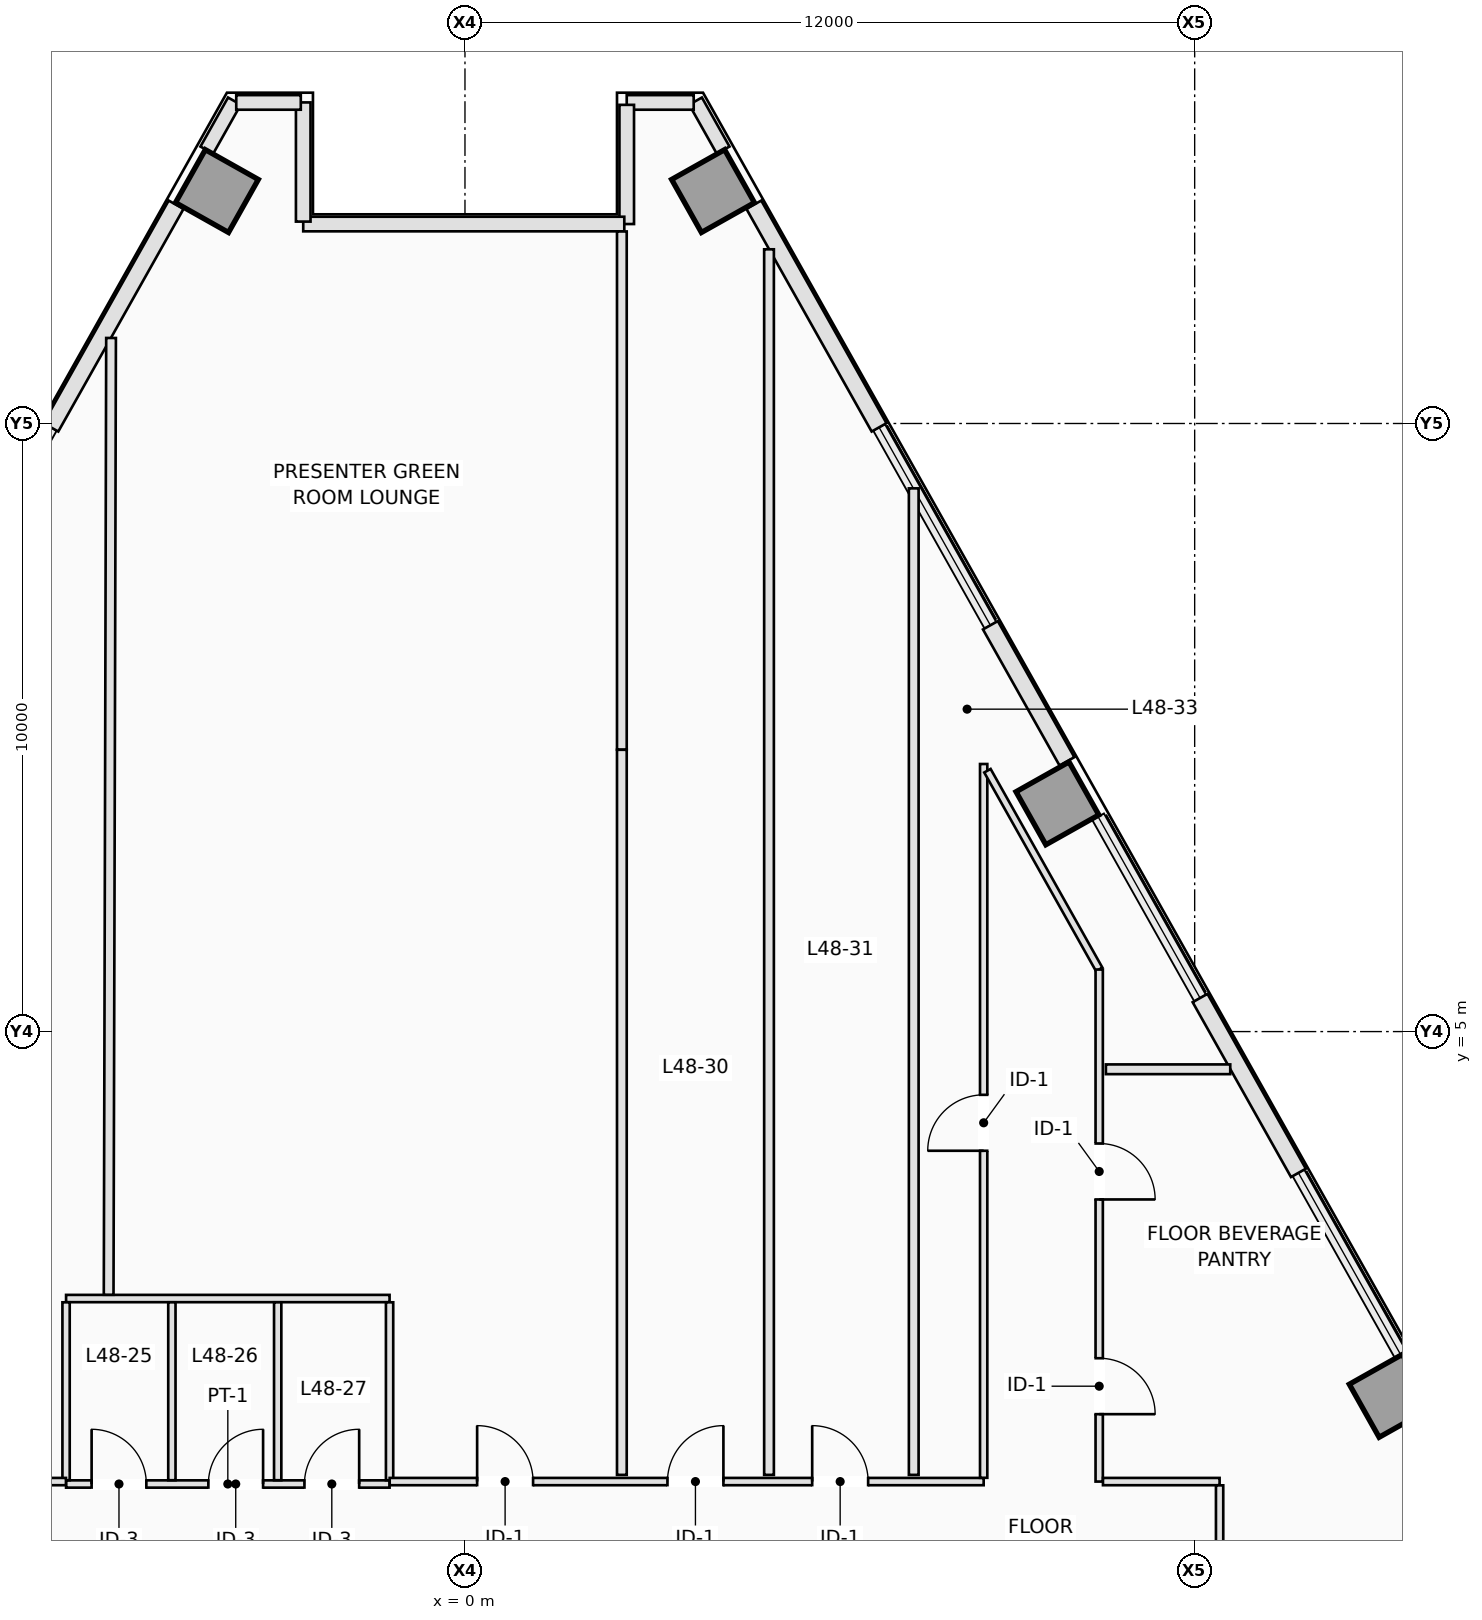
"""IFC4 building model, lengths in metres.
Left out: names, types, materials, properties, quantities, classifications, styles, units other than length and angle.
Written with IfcOpenShell. Run it as: python <this file> out.ifc"""

import sys

from ifc_helpers import new_model, si_unit, direction, frame, frame_2d, origin, origin_2d, place, context, subcontext, project, spatial, rectangle, extrude, element, fill, save


model = new_model("IFC4")
c1 = context("Model", 3, precision=1e-05, world=origin(), true_north=direction((0.0, 1.0)))
c2 = subcontext(c1, "Body", "Model", "MODEL_VIEW")
j1 = project(units=[si_unit("LENGTHUNIT", "METRE"), si_unit("PLANEANGLEUNIT", "RADIAN")], contexts=[c1])
p1 = place(None, origin())
s1 = spatial("IfcSite", under=j1, at=p1, CompositionType="ELEMENT")
p2 = place(p1, origin())
s2 = spatial("IfcBuilding", under=s1, at=p2, CompositionType="ELEMENT")
p3 = place(p2, frame((0.0, 0.0, 175.5)))
s3 = spatial("IfcBuildingStorey", under=s2, at=p3, CompositionType="ELEMENT", Elevation=175.5)
for number, where, z_axis, x_axis in (
    (1, (15.224, -0.991, 0.0), (0.0, 0.0, 1.0), (0.872, 0.49, 0.0)),
    (2, (9.743, 8.753, 0.0), (0.0, 0.0, 1.0), (0.872, 0.49, 0.0)),
    (3, (4.079, 18.822, 0.0), (0.0, 0.0, 1.0), (0.872, 0.49, 0.0)),
    (4, (-4.079, 18.822, 0.0), (0.0, 0.0, 1.0), (-0.872, 0.49, 0.0)),
):
    element("IfcColumn", number, at=place(p3, frame(where, z_axis=z_axis, x_axis=x_axis)), inside=s3, PredefinedType="COLUMN", context=c2, shape_type="SweptSolid", body=[
        extrude(rectangle(XDim=1.0, YDim=1.0, at=origin_2d()), origin(), (0.0, 0.0, 1.0), 3.5),
    ])
p4 = place(p3, frame((3.792, 20.302, 0.0), z_axis=(0.0, 0.0, 1.0), x_axis=(0.490048346303, -0.871695255399, 0.0)))
e5 = element("IfcWall", 5, at=p4, inside=s3, PredefinedType="STANDARD", context=c2, shape_type="SweptSolid", body=[
    extrude(rectangle(XDim=0.926, YDim=0.24, at=frame_2d((0.463, 0.0))), origin(), (0.0, 0.0, 1.0), 3.14),
])
p5 = place(p3, frame((4.751, 18.597, 0.0), z_axis=(0.0, 0.0, 1.0), x_axis=(0.490250201787, -0.871581745821, 0.0)))
e6 = element("IfcWall", 6, at=p5, inside=s3, PredefinedType="STANDARD", context=c2, shape_type="SweptSolid", body=[
    extrude(rectangle(XDim=4.201, YDim=0.28, at=frame_2d((2.1, 0.0))), origin(), (0.0, 0.0, 1.0), 3.14),
])
p6 = place(p3, frame((8.641, 11.682, 0.0), z_axis=(0.0, 0.0, 1.0), x_axis=(0.490301864627, -0.871552684319, 0.0)))
e7 = element("IfcWall", 7, at=p6, inside=s3, PredefinedType="STANDARD", context=c2, shape_type="SweptSolid", body=[
    extrude(rectangle(XDim=2.568, YDim=0.28, at=frame_2d((1.284, 0.0))), origin(), (0.0, 0.0, 1.0), 3.14),
])
p7 = place(p3, frame((12.089, 5.552, 0.0), z_axis=(0.0, 0.0, 1.0), x_axis=(0.490285834707, -0.871561701938, 0.0)))
e8 = element("IfcWall", 8, at=p7, inside=s3, PredefinedType="STANDARD", context=c2, shape_type="SweptSolid", body=[
    extrude(rectangle(XDim=3.299, YDim=0.28, at=frame_2d((1.649, 0.0))), origin(), (0.0, 0.0, 1.0), 3.14),
])
p8 = place(p3, frame((-4.246, 19.495, 0.0), z_axis=(0.0, 0.0, 1.0), x_axis=(0.490048346303, 0.871695255399, 0.0)))
e9 = element("IfcWall", 9, at=p8, inside=s3, PredefinedType="STANDARD", context=c2, shape_type="SweptSolid", body=[
    extrude(rectangle(XDim=0.926, YDim=0.24, at=frame_2d((0.463, 0.0))), origin(), (0.0, 0.0, 1.0), 3.14),
])
p9 = place(p3, frame((-6.81, 14.936, 0.0), z_axis=(0.0, 0.0, 1.0), x_axis=(0.490250201787, 0.871581745821, 0.0)))
e10 = element("IfcWall", 10, at=p9, inside=s3, PredefinedType="STANDARD", context=c2, shape_type="SweptSolid", body=[
    extrude(rectangle(XDim=4.201, YDim=0.28, at=frame_2d((2.1, 0.0))), origin(), (0.0, 0.0, 1.0), 3.14),
])
p10 = place(p3, frame((3.761, 20.28, 0.0), z_axis=(0.0, 0.0, 1.0), x_axis=(-1.0, 0.0, 0.0)))
e11 = element("IfcWall", 11, at=p10, inside=s3, PredefinedType="STANDARD", context=c2, shape_type="SweptSolid", body=[
    extrude(rectangle(XDim=1.102, YDim=0.24, at=frame_2d((0.551, 0.0))), origin(), (0.0, 0.0, 1.0), 3.14),
])
p11 = place(p3, frame((2.66, 20.24, 0.0), z_axis=(0.0, 0.0, 1.0), x_axis=(0.0, -1.0, 0.0)))
e12 = element("IfcWall", 12, at=p11, inside=s3, PredefinedType="STANDARD", context=c2, shape_type="SweptSolid", body=[
    extrude(rectangle(XDim=1.96, YDim=0.24, at=frame_2d((0.98, 0.0))), origin(), (0.0, 0.0, 1.0), 3.14),
])
p12 = place(p3, frame((2.62, 18.28, 0.0), z_axis=(0.0, 0.0, 1.0), x_axis=(-1.0, 0.0, 0.0)))
e13 = element("IfcWall", 13, at=p12, inside=s3, PredefinedType="STANDARD", context=c2, shape_type="SweptSolid", body=[
    extrude(rectangle(XDim=5.28, YDim=0.24, at=frame_2d((2.64, 0.0))), origin(), (0.0, 0.0, 1.0), 2.607),
])
p13 = place(p3, frame((-2.66, 18.32, 0.0), z_axis=(0.0, 0.0, 1.0), x_axis=(0.0, 1.0, 0.0)))
e14 = element("IfcWall", 14, at=p13, inside=s3, PredefinedType="STANDARD", context=c2, shape_type="SweptSolid", body=[
    extrude(rectangle(XDim=1.96, YDim=0.24, at=frame_2d((0.98, 0.0))), origin(), (0.0, 0.0, 1.0), 3.14),
])
p14 = place(p3, frame((-2.7, 20.28, 0.0), z_axis=(0.0, 0.0, 1.0), x_axis=(-1.0, 0.0, 0.0)))
e15 = element("IfcWall", 15, at=p14, inside=s3, PredefinedType="STANDARD", context=c2, shape_type="SweptSolid", body=[
    extrude(rectangle(XDim=1.062, YDim=0.24, at=frame_2d((0.531, 0.0))), origin(), (0.0, 0.0, 1.0), 3.14),
])
p15 = place(p3, frame((-6.56, -2.44, 0.0), z_axis=(0.0, 0.0, 1.0), x_axis=(1.0, 0.0, 0.0)))
e16 = element("IfcWall", 16, at=p15, inside=s3, PredefinedType="PARTITIONING", context=c2, shape_type="SweptSolid", body=[
    extrude(rectangle(XDim=5.32, YDim=0.12, at=frame_2d((2.66, 0.0))), origin(), (0.0, 0.0, 1.0), 2.781),
])
p16 = place(p15, frame((0.42, 0.0, 0.0)))
e17 = element("IfcOpeningElement", 17, at=p16, cuts=e16, PredefinedType="OPENING", context=c2, shape_type="SweptSolid", body=[
    extrude(rectangle(XDim=0.9, YDim=2.12, at=frame_2d((0.45, 1.06))), frame((0.0, 0.07, 0.0), z_axis=(0.0, -1.0, 0.0), x_axis=(1.0, 0.0, 0.0)), (0.0, 0.0, 1.0), 0.14),
])
p17 = place(p15, frame((2.34, 0.0, 0.0)))
e18 = element("IfcOpeningElement", 18, at=p17, cuts=e16, PredefinedType="OPENING", context=c2, shape_type="SweptSolid", body=[
    extrude(rectangle(XDim=0.9, YDim=2.12, at=frame_2d((0.45, 1.06))), frame((0.0, 0.07, 0.0), z_axis=(0.0, -1.0, 0.0), x_axis=(1.0, 0.0, 0.0)), (0.0, 0.0, 1.0), 0.14),
])
p18 = place(p15, frame((3.92, 0.0, 0.0)))
e19 = element("IfcOpeningElement", 19, at=p18, cuts=e16, PredefinedType="OPENING", context=c2, shape_type="SweptSolid", body=[
    extrude(rectangle(XDim=0.9, YDim=2.12, at=frame_2d((0.45, 1.06))), frame((0.0, 0.07, 0.0), z_axis=(0.0, -1.0, 0.0), x_axis=(1.0, 0.0, 0.0)), (0.0, 0.0, 1.0), 0.14),
])
p19 = place(p3, frame((-6.56, 0.61, 0.0), z_axis=(0.0, 0.0, 1.0), x_axis=(1.0, 0.0, 0.0)))
e20 = element("IfcWall", 20, at=p19, inside=s3, PredefinedType="PARTITIONING", context=c2, shape_type="SweptSolid", body=[
    extrude(rectangle(XDim=5.32, YDim=0.12, at=frame_2d((2.66, 0.0))), origin(), (0.0, 0.0, 1.0), 3.14),
])
for number, where, z_axis, x_axis in (
    (21, (-6.56, -2.378, 0.0), (0.0, 0.0, 1.0), (0.0, 1.0, 0.0)),
    (22, (-4.82, -2.378, 0.0), (0.0, 0.0, 1.0), (0.0, 1.0, 0.0)),
    (23, (-3.08, -2.378, 0.0), (0.0, 0.0, 1.0), (0.0, 1.0, 0.0)),
    (24, (-1.24, -2.378, 0.0), (0.0, 0.0, 1.0), (0.0, 1.0, 0.0)),
):
    element("IfcWall", number, at=place(p3, frame(where, z_axis=z_axis, x_axis=x_axis)), inside=s3, PredefinedType="PARTITIONING", context=c2, shape_type="SweptSolid", body=[
        extrude(rectangle(XDim=2.926, YDim=0.12, at=frame_2d((1.463, 0.0))), origin(), (0.0, 0.0, 1.0), 3.14),
    ])
p20 = place(p3, frame((-8.408, -2.4, 0.0), z_axis=(0.0, 0.0, 1.0), x_axis=(1.0, 0.0, 0.0)))
e25 = element("IfcWall", 25, at=p20, inside=s3, PredefinedType="PARTITIONING", context=c2, shape_type="SweptSolid", body=[
    extrude(rectangle(XDim=1.846, YDim=0.12, at=frame_2d((0.923, 0.0))), origin(), (0.0, 0.0, 1.0), 3.14),
])
p21 = place(p3, frame((-1.238, -2.4, 0.0), z_axis=(0.0, 0.0, 1.0), x_axis=(1.0, 0.0, 0.0)))
e26 = element("IfcWall", 26, at=p21, inside=s3, PredefinedType="PARTITIONING", context=c2, shape_type="SweptSolid", body=[
    extrude(rectangle(XDim=9.768, YDim=0.12, at=frame_2d((4.884, 0.0))), origin(), (0.0, 0.0, 1.0), 2.781),
])
p22 = place(p21, frame((1.438, 0.0, 0.0)))
e27 = element("IfcOpeningElement", 27, at=p22, cuts=e26, PredefinedType="OPENING", context=c2, shape_type="SweptSolid", body=[
    extrude(rectangle(XDim=0.92, YDim=2.12, at=frame_2d((0.46, 1.06))), frame((0.0, 0.07, 0.0), z_axis=(0.0, -1.0, 0.0), x_axis=(1.0, 0.0, 0.0)), (0.0, 0.0, 1.0), 0.14),
])
p23 = place(p21, frame((4.568, 0.0, 0.0)))
e28 = element("IfcOpeningElement", 28, at=p23, cuts=e26, PredefinedType="OPENING", context=c2, shape_type="SweptSolid", body=[
    extrude(rectangle(XDim=0.92, YDim=2.12, at=frame_2d((0.46, 1.06))), frame((0.0, 0.07, 0.0), z_axis=(0.0, -1.0, 0.0), x_axis=(1.0, 0.0, 0.0)), (0.0, 0.0, 1.0), 0.14),
])
p24 = place(p21, frame((6.948, 0.0, 0.0)))
e29 = element("IfcOpeningElement", 29, at=p24, cuts=e26, PredefinedType="OPENING", context=c2, shape_type="SweptSolid", body=[
    extrude(rectangle(XDim=0.92, YDim=2.12, at=frame_2d((0.46, 1.06))), frame((0.0, 0.07, 0.0), z_axis=(0.0, -1.0, 0.0), x_axis=(1.0, 0.0, 0.0)), (0.0, 0.0, 1.0), 0.14),
])
p25 = place(p3, frame((8.53, -2.338, 0.0), z_axis=(0.0, 0.0, 1.0), x_axis=(0.0, 1.0, 0.0)))
e30 = element("IfcWall", 30, at=p25, inside=s3, PredefinedType="PARTITIONING", context=c2, shape_type="SweptSolid", body=[
    extrude(rectangle(XDim=11.738, YDim=0.12, at=frame_2d((5.869, 0.0))), origin(), (0.0, 0.0, 1.0), 3.14),
])
p26 = place(p25, frame((5.378, 0.0, 0.0)))
e31 = element("IfcOpeningElement", 31, at=p26, cuts=e30, PredefinedType="OPENING", context=c2, shape_type="SweptSolid", body=[
    extrude(rectangle(XDim=0.92, YDim=2.12, at=frame_2d((0.46, 1.06))), frame((0.0, 0.07, 0.0), z_axis=(0.0, -1.0, 0.0), x_axis=(1.0, 0.0, 0.0)), (0.0, 0.0, 1.0), 0.14),
])
p27 = place(p3, frame((8.592, 9.29, 0.0), z_axis=(0.0, 0.0, 1.0), x_axis=(0.490264331639, -0.871573797864, 0.0)))
e32 = element("IfcWall", 32, at=p27, inside=s3, PredefinedType="PARTITIONING", context=c2, shape_type="SweptSolid", body=[
    extrude(rectangle(XDim=3.749, YDim=0.12, at=frame_2d((1.875, 0.0))), origin(), (0.0, 0.0, 1.0), 3.14),
])
p28 = place(p3, frame((10.43, 6.02, 0.0), z_axis=(0.0, 0.0, 1.0), x_axis=(0.0, -1.0, 0.0)))
e33 = element("IfcWall", 33, at=p28, inside=s3, PredefinedType="PARTITIONING", context=c2, shape_type="SweptSolid", body=[
    extrude(rectangle(XDim=8.42, YDim=0.12, at=frame_2d((4.21, 0.0))), origin(), (0.0, 0.0, 1.0), 3.14),
])
p29 = place(p28, frame((2.861, 0.0, 0.0)))
e34 = element("IfcOpeningElement", 34, at=p29, cuts=e33, PredefinedType="OPENING", context=c2, shape_type="SweptSolid", body=[
    extrude(rectangle(XDim=0.92, YDim=2.12, at=frame_2d((0.46, 1.06))), frame((0.0, 0.07, 0.0), z_axis=(0.0, -1.0, 0.0), x_axis=(1.0, 0.0, 0.0)), (0.0, 0.0, 1.0), 0.14),
])
p30 = place(p28, frame((6.392, 0.0, 0.0)))
e35 = element("IfcOpeningElement", 35, at=p30, cuts=e33, PredefinedType="OPENING", context=c2, shape_type="SweptSolid", body=[
    extrude(rectangle(XDim=0.92, YDim=2.12, at=frame_2d((0.46, 1.06))), frame((0.0, 0.07, 0.0), z_axis=(0.0, -1.0, 0.0), x_axis=(1.0, 0.0, 0.0)), (0.0, 0.0, 1.0), 0.14),
])
p31 = place(p3, frame((10.492, -2.4, 0.0), z_axis=(0.0, 0.0, 1.0), x_axis=(1.0, 0.0, 0.0)))
e36 = element("IfcWall", 36, at=p31, inside=s3, PredefinedType="PARTITIONING", context=c2, shape_type="SweptSolid", body=[
    extrude(rectangle(XDim=1.918, YDim=0.12, at=frame_2d((0.959, 0.0))), origin(), (0.0, 0.0, 1.0), 3.14),
])
p32 = place(p3, frame((12.41, -2.462, 0.0), z_axis=(0.0, 0.0, 1.0), x_axis=(0.0, -1.0, 0.0)))
e37 = element("IfcWall", 37, at=p32, inside=s3, PredefinedType="PARTITIONING", context=c2, shape_type="SweptSolid", body=[
    extrude(rectangle(XDim=1.786, YDim=0.12, at=frame_2d((0.893, 0.0))), origin(), (0.0, 0.0, 1.0), 3.14),
])
p33 = place(p3, frame((2.58, 18.158, 0.0), z_axis=(0.0, 0.0, 1.0), x_axis=(0.0, -1.0, 0.0)))
e38 = element("IfcWall", 38, at=p33, inside=s3, PredefinedType="PARTITIONING", context=c2, shape_type="SweptSolid", body=[
    extrude(rectangle(XDim=8.522, YDim=0.16, at=frame_2d((4.261, 0.0))), origin(), (0.0, 0.0, 1.0), 3.14),
])
p34 = place(p3, frame((2.58, 9.634, 0.0), z_axis=(0.0, 0.0, 1.0), x_axis=(0.0, -1.0, 0.0)))
e39 = element("IfcWall", 39, at=p34, inside=s3, PredefinedType="PARTITIONING", context=c2, shape_type="SweptSolid", body=[
    extrude(rectangle(XDim=11.924, YDim=0.16, at=frame_2d((5.962, 0.0))), origin(), (0.0, 0.0, 1.0), 3.14),
])
p35 = place(p3, frame((-5.86, 0.672, 0.0), z_axis=(0.0, 0.0, 1.0), x_axis=(0.002513685481, 0.999996840688, 0.0)))
e40 = element("IfcWall", 40, at=p35, inside=s3, PredefinedType="PARTITIONING", context=c2, shape_type="SweptSolid", body=[
    extrude(rectangle(XDim=15.734, YDim=0.16, at=frame_2d((7.867, 0.0))), origin(), (0.0, 0.0, 1.0), 3.14),
])
p36 = place(p3, frame((5.0, 17.865, 0.0), z_axis=(0.0, 0.0, 1.0), x_axis=(0.0, -1.0, 0.0)))
e41 = element("IfcWall", 41, at=p36, inside=s3, PredefinedType="PARTITIONING", context=c2, shape_type="SweptSolid", body=[
    extrude(rectangle(XDim=20.155, YDim=0.16, at=frame_2d((10.077, 0.0))), origin(), (0.0, 0.0, 1.0), 3.14),
])
p37 = place(p3, frame((7.38, 13.933, 0.0), z_axis=(0.0, 0.0, 1.0), x_axis=(0.0, -1.0, 0.0)))
e42 = element("IfcWall", 42, at=p37, inside=s3, PredefinedType="PARTITIONING", context=c2, shape_type="SweptSolid", body=[
    extrude(rectangle(XDim=16.223, YDim=0.16, at=frame_2d((8.112, 0.0))), origin(), (0.0, 0.0, 1.0), 3.14),
])
p38 = place(p3, frame((12.585, 4.38, 0.0), z_axis=(0.0, 0.0, 1.0), x_axis=(-1.0, 0.0, 0.0)))
e43 = element("IfcWall", 43, at=p38, inside=s3, PredefinedType="PARTITIONING", context=c2, shape_type="SweptSolid", body=[
    extrude(rectangle(XDim=2.045, YDim=0.16, at=frame_2d((1.022, 0.0))), origin(), (0.0, 0.0, 1.0), 3.14),
])
p39 = place(p16, origin())
e44 = element("IfcDoor", 44, at=p39, inside=s3, OperationType="SINGLE_SWING_LEFT", PredefinedType="DOOR", context=c2, shape_type="SweptSolid", body=[
    extrude(rectangle(XDim=0.9, YDim=2.12, at=frame_2d((0.45, 1.06))), frame((0.0, 0.025, 0.0), z_axis=(0.0, -1.0, 0.0), x_axis=(1.0, 0.0, 0.0)), (0.0, 0.0, 1.0), 0.05),
])
fill(e17, e44)
p40 = place(p17, origin())
e45 = element("IfcDoor", 45, at=p40, inside=s3, OperationType="SINGLE_SWING_RIGHT", PredefinedType="DOOR", context=c2, shape_type="SweptSolid", body=[
    extrude(rectangle(XDim=0.9, YDim=2.12, at=frame_2d((0.45, 1.06))), frame((0.0, 0.025, 0.0), z_axis=(0.0, -1.0, 0.0), x_axis=(1.0, 0.0, 0.0)), (0.0, 0.0, 1.0), 0.05),
])
fill(e18, e45)
p41 = place(p18, origin())
e46 = element("IfcDoor", 46, at=p41, inside=s3, OperationType="SINGLE_SWING_RIGHT", PredefinedType="DOOR", context=c2, shape_type="SweptSolid", body=[
    extrude(rectangle(XDim=0.9, YDim=2.12, at=frame_2d((0.45, 1.06))), frame((0.0, 0.025, 0.0), z_axis=(0.0, -1.0, 0.0), x_axis=(1.0, 0.0, 0.0)), (0.0, 0.0, 1.0), 0.05),
])
fill(e19, e46)
p42 = place(p22, origin())
e47 = element("IfcDoor", 47, at=p42, inside=s3, OperationType="SINGLE_SWING_LEFT", PredefinedType="DOOR", context=c2, shape_type="SweptSolid", body=[
    extrude(rectangle(XDim=0.92, YDim=2.12, at=frame_2d((0.46, 1.06))), frame((0.0, 0.025, 0.0), z_axis=(0.0, -1.0, 0.0), x_axis=(1.0, 0.0, 0.0)), (0.0, 0.0, 1.0), 0.05),
])
fill(e27, e47)
p43 = place(p23, origin())
e48 = element("IfcDoor", 48, at=p43, inside=s3, OperationType="SINGLE_SWING_RIGHT", PredefinedType="DOOR", context=c2, shape_type="SweptSolid", body=[
    extrude(rectangle(XDim=0.92, YDim=2.12, at=frame_2d((0.46, 1.06))), frame((0.0, 0.025, 0.0), z_axis=(0.0, -1.0, 0.0), x_axis=(1.0, 0.0, 0.0)), (0.0, 0.0, 1.0), 0.05),
])
fill(e28, e48)
p44 = place(p24, origin())
e49 = element("IfcDoor", 49, at=p44, inside=s3, OperationType="SINGLE_SWING_LEFT", PredefinedType="DOOR", context=c2, shape_type="SweptSolid", body=[
    extrude(rectangle(XDim=0.92, YDim=2.12, at=frame_2d((0.46, 1.06))), frame((0.0, 0.025, 0.0), z_axis=(0.0, -1.0, 0.0), x_axis=(1.0, 0.0, 0.0)), (0.0, 0.0, 1.0), 0.05),
])
fill(e29, e49)
p45 = place(p26, origin())
e50 = element("IfcDoor", 50, at=p45, inside=s3, OperationType="SINGLE_SWING_LEFT", PredefinedType="DOOR", context=c2, shape_type="SweptSolid", body=[
    extrude(rectangle(XDim=0.92, YDim=2.12, at=frame_2d((0.46, 1.06))), frame((0.0, 0.025, 0.0), z_axis=(0.0, -1.0, 0.0), x_axis=(1.0, 0.0, 0.0)), (0.0, 0.0, 1.0), 0.05),
])
fill(e31, e50)
p46 = place(p29, origin())
e51 = element("IfcDoor", 51, at=p46, inside=s3, OperationType="SINGLE_SWING_RIGHT", PredefinedType="DOOR", context=c2, shape_type="SweptSolid", body=[
    extrude(rectangle(XDim=0.92, YDim=2.12, at=frame_2d((0.46, 1.06))), frame((0.0, 0.025, 0.0), z_axis=(0.0, -1.0, 0.0), x_axis=(1.0, 0.0, 0.0)), (0.0, 0.0, 1.0), 0.05),
])
fill(e34, e51)
p47 = place(p30, origin())
e52 = element("IfcDoor", 52, at=p47, inside=s3, OperationType="SINGLE_SWING_RIGHT", PredefinedType="DOOR", context=c2, shape_type="SweptSolid", body=[
    extrude(rectangle(XDim=0.92, YDim=2.12, at=frame_2d((0.46, 1.06))), frame((0.0, 0.025, 0.0), z_axis=(0.0, -1.0, 0.0), x_axis=(1.0, 0.0, 0.0)), (0.0, 0.0, 1.0), 0.05),
])
fill(e35, e52)
save(model, sys.argv[1])
